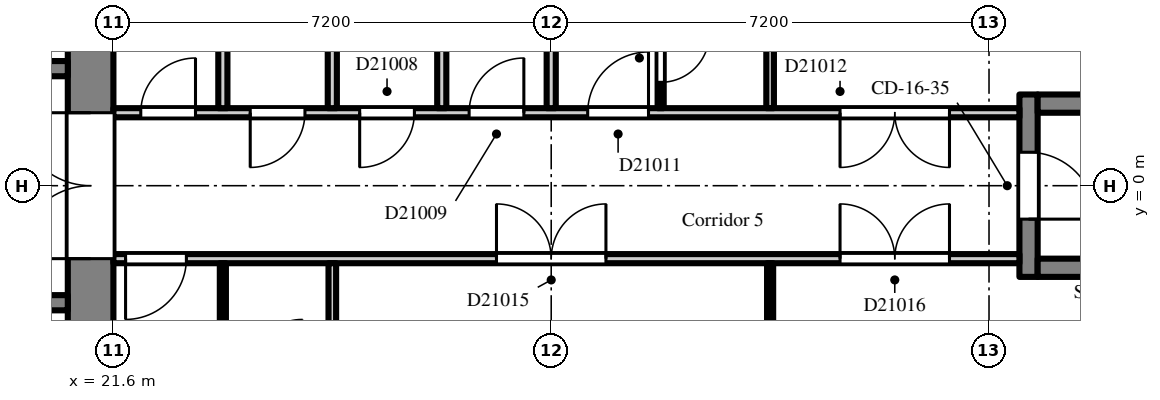
"""IFC4 building model, lengths in metres.
Left out: names, types, materials, properties, quantities, classifications, styles, units other than length and angle.
Written with IfcOpenShell. Run it as: python <this file> out.ifc"""

import sys

from ifc_helpers import new_model, si_unit, direction, frame, frame_2d, origin, place, context, subcontext, project, spatial, rectangle, extrude, element, fill, save


model = new_model("IFC4")
c1 = context("Model", 3, precision=1e-05, world=origin(), true_north=direction((0.0, 1.0)))
c2 = subcontext(c1, "Body", "Model", "MODEL_VIEW")
j1 = project(units=[si_unit("LENGTHUNIT", "METRE"), si_unit("PLANEANGLEUNIT", "RADIAN")], contexts=[c1])
p1 = place(None, origin())
s1 = spatial("IfcSite", under=j1, at=p1, CompositionType="ELEMENT")
p2 = place(p1, origin())
s2 = spatial("IfcBuilding", under=s1, at=p2, CompositionType="ELEMENT")
p3 = place(p2, frame((0.0, 0.0, 147.3)))
s3 = spatial("IfcBuildingStorey", under=s2, at=p3, CompositionType="ELEMENT", Elevation=147.3)
p4 = place(p3, frame((21.225, -7.2, 0.0), z_axis=(0.0, 0.0, 1.0), x_axis=(0.0, 1.0, 0.0)))
e1 = element("IfcWall", 1, at=p4, inside=s3, PredefinedType="SHEAR", context=c2, shape_type="SweptSolid", body=[
    extrude(rectangle(XDim=14.4, YDim=0.75, at=frame_2d((7.2, 0.0))), origin(), (0.0, 0.0, 1.0), 2.6),
])
p5 = place(p4, frame((6.0, 0.0, 0.0)))
e2 = element("IfcOpeningElement", 2, at=p5, cuts=e1, PredefinedType="OPENING", context=c2, shape_type="SweptSolid", body=[
    extrude(rectangle(XDim=2.4, YDim=2.2, at=frame_2d((1.2, 1.1))), frame((0.0, 0.385, 0.0), z_axis=(0.0, -1.0, 0.0), x_axis=(1.0, 0.0, 0.0)), (0.0, 0.0, 1.0), 0.77),
])
p6 = place(p3, frame((7.9, 1.925, 0.0), z_axis=(0.0, 0.0, 1.0), x_axis=(1.0, 0.0, 0.0)))
e3 = element("IfcWall", 3, at=p6, inside=s3, PredefinedType="SHEAR", context=c2, shape_type="SweptSolid", body=[
    extrude(rectangle(XDim=12.95, YDim=0.25, at=frame_2d((6.475, 0.0))), origin(), (0.0, 0.0, 1.0), 2.6),
])
p7 = place(p6, frame((4.825, 0.0, 0.0)))
e4 = element("IfcOpeningElement", 4, at=p7, cuts=e3, PredefinedType="OPENING", context=c2, shape_type="SweptSolid", body=[
    extrude(rectangle(XDim=1.1, YDim=2.1, at=frame_2d((0.55, 1.05))), frame((0.0, 0.135, 0.0), z_axis=(0.0, -1.0, 0.0), x_axis=(1.0, 0.0, 0.0)), (0.0, 0.0, 1.0), 0.27),
])
p8 = place(p6, frame((7.025, 0.0, 0.0)))
e5 = element("IfcOpeningElement", 5, at=p8, cuts=e3, PredefinedType="OPENING", context=c2, shape_type="SweptSolid", body=[
    extrude(rectangle(XDim=1.1, YDim=2.1, at=frame_2d((0.55, 1.05))), frame((0.0, 0.135, 0.0), z_axis=(0.0, -1.0, 0.0), x_axis=(1.0, 0.0, 0.0)), (0.0, 0.0, 1.0), 0.27),
])
p9 = place(p6, frame((9.225, 0.0, 0.0)))
e6 = element("IfcOpeningElement", 6, at=p9, cuts=e3, PredefinedType="OPENING", context=c2, shape_type="SweptSolid", body=[
    extrude(rectangle(XDim=1.1, YDim=2.1, at=frame_2d((0.55, 1.05))), frame((0.0, 0.135, 0.0), z_axis=(0.0, -1.0, 0.0), x_axis=(1.0, 0.0, 0.0)), (0.0, 0.0, 1.0), 0.27),
])
p10 = place(p6, frame((0.525, 0.0, 0.0)))
e7 = element("IfcOpeningElement", 7, at=p10, cuts=e3, PredefinedType="OPENING", context=c2, shape_type="SweptSolid", body=[
    extrude(rectangle(XDim=0.9, YDim=2.1, at=frame_2d((0.45, 1.05))), frame((0.0, 0.135, 0.0), z_axis=(0.0, -1.0, 0.0), x_axis=(1.0, 0.0, 0.0)), (0.0, 0.0, 1.0), 0.27),
])
p11 = place(p6, frame((2.625, 0.0, 0.0)))
e8 = element("IfcOpeningElement", 8, at=p11, cuts=e3, PredefinedType="OPENING", context=c2, shape_type="SweptSolid", body=[
    extrude(rectangle(XDim=1.1, YDim=2.1, at=frame_2d((0.55, 1.05))), frame((0.0, 0.135, 0.0), z_axis=(0.0, -1.0, 0.0), x_axis=(1.0, 0.0, 0.0)), (0.0, 0.0, 1.0), 0.27),
])
p12 = place(p6, frame((11.525, 0.0, 0.0)))
e9 = element("IfcOpeningElement", 9, at=p12, cuts=e3, PredefinedType="OPENING", context=c2, shape_type="SweptSolid", body=[
    extrude(rectangle(XDim=0.9, YDim=2.1, at=frame_2d((0.45, 1.05))), frame((0.0, 0.135, 0.0), z_axis=(0.0, -1.0, 0.0), x_axis=(1.0, 0.0, 0.0)), (0.0, 0.0, 1.0), 0.27),
])
p13 = place(p3, frame((7.9, -1.925, 0.0), z_axis=(0.0, 0.0, 1.0), x_axis=(1.0, 0.0, 0.0)))
e10 = element("IfcWall", 10, at=p13, inside=s3, PredefinedType="SHEAR", context=c2, shape_type="SweptSolid", body=[
    extrude(rectangle(XDim=12.95, YDim=0.25, at=frame_2d((6.475, 0.0))), origin(), (0.0, 0.0, 1.0), 2.6),
])
p14 = place(p13, frame((0.525, 0.0, 0.0)))
e11 = element("IfcOpeningElement", 11, at=p14, cuts=e10, PredefinedType="OPENING", context=c2, shape_type="SweptSolid", body=[
    extrude(rectangle(XDim=0.9, YDim=2.1, at=frame_2d((0.45, 1.05))), frame((0.0, 0.135, 0.0), z_axis=(0.0, -1.0, 0.0), x_axis=(1.0, 0.0, 0.0)), (0.0, 0.0, 1.0), 0.27),
])
p15 = place(p13, frame((2.625, 0.0, 0.0)))
e12 = element("IfcOpeningElement", 12, at=p15, cuts=e10, PredefinedType="OPENING", context=c2, shape_type="SweptSolid", body=[
    extrude(rectangle(XDim=1.1, YDim=2.1, at=frame_2d((0.55, 1.05))), frame((0.0, 0.135, 0.0), z_axis=(0.0, -1.0, 0.0), x_axis=(1.0, 0.0, 0.0)), (0.0, 0.0, 1.0), 0.27),
])
p16 = place(p13, frame((4.925, 0.0, 0.0)))
e13 = element("IfcOpeningElement", 13, at=p16, cuts=e10, PredefinedType="OPENING", context=c2, shape_type="SweptSolid", body=[
    extrude(rectangle(XDim=0.9, YDim=2.1, at=frame_2d((0.45, 1.05))), frame((0.0, 0.135, 0.0), z_axis=(0.0, -1.0, 0.0), x_axis=(1.0, 0.0, 0.0)), (0.0, 0.0, 1.0), 0.27),
])
p17 = place(p13, frame((8.225, 0.0, 0.0)))
e14 = element("IfcOpeningElement", 14, at=p17, cuts=e10, PredefinedType="OPENING", context=c2, shape_type="SweptSolid", body=[
    extrude(rectangle(XDim=0.9, YDim=2.1, at=frame_2d((0.45, 1.05))), frame((0.0, 0.135, 0.0), z_axis=(0.0, -1.0, 0.0), x_axis=(1.0, 0.0, 0.0)), (0.0, 0.0, 1.0), 0.27),
])
p18 = place(p13, frame((11.525, 0.0, 0.0)))
e15 = element("IfcOpeningElement", 15, at=p18, cuts=e10, PredefinedType="OPENING", context=c2, shape_type="SweptSolid", body=[
    extrude(rectangle(XDim=0.9, YDim=2.1, at=frame_2d((0.45, 1.05))), frame((0.0, 0.135, 0.0), z_axis=(0.0, -1.0, 0.0), x_axis=(1.0, 0.0, 0.0)), (0.0, 0.0, 1.0), 0.27),
])
p19 = place(p3, frame((36.65, -1.5, 0.0), z_axis=(0.0, 0.0, 1.0), x_axis=(0.0, 1.0, 0.0)))
e16 = element("IfcWall", 16, at=p19, inside=s3, PredefinedType="SHEAR", context=c2, shape_type="SweptSolid", body=[
    extrude(rectangle(XDim=3.0, YDim=0.3, at=frame_2d((1.5, 0.0))), origin(), (0.0, 0.0, 1.0), 2.6),
])
p20 = place(p19, frame((0.95, 0.0, 0.0)))
e17 = element("IfcOpeningElement", 17, at=p20, cuts=e16, PredefinedType="OPENING", context=c2, shape_type="SweptSolid", body=[
    extrude(rectangle(XDim=1.1, YDim=2.1, at=frame_2d((0.55, 1.05))), frame((0.0, 0.16, 0.0), z_axis=(0.0, -1.0, 0.0), x_axis=(1.0, 0.0, 0.0)), (0.0, 0.0, 1.0), 0.32),
])
for number, where, z_axis, x_axis in (
    (18, (36.8, -1.35, 0.0), (0.0, 0.0, 1.0), (1.0, 0.0, 0.0)),
    (19, (36.8, 1.35, 0.0), (0.0, 0.0, 1.0), (1.0, 0.0, 0.0)),
):
    element("IfcWall", number, at=place(p3, frame(where, z_axis=z_axis, x_axis=x_axis)), inside=s3, PredefinedType="SHEAR", context=c2, shape_type="SweptSolid", body=[
        extrude(rectangle(XDim=5.8, YDim=0.3, at=frame_2d((2.9, 0.0))), origin(), (0.0, 0.0, 1.0), 2.6),
    ])
p21 = place(p3, frame((21.6, -1.2, 0.0), z_axis=(0.0, 0.0, 1.0), x_axis=(1.0, 0.0, 0.0)))
e20 = element("IfcWall", 20, at=p21, inside=s3, PredefinedType="PARTITIONING", context=c2, shape_type="SweptSolid", body=[
    extrude(rectangle(XDim=14.9, YDim=0.15, at=frame_2d((7.45, 0.0))), origin(), (0.0, 0.0, 1.0), 2.6),
])
p22 = place(p21, frame((0.2, 0.0, 0.0)))
e21 = element("IfcOpeningElement", 21, at=p22, cuts=e20, PredefinedType="OPENING", context=c2, shape_type="SweptSolid", body=[
    extrude(rectangle(XDim=1.0, YDim=2.1, at=frame_2d((0.5, 1.05))), frame((0.0, 0.085, 0.0), z_axis=(0.0, -1.0, 0.0), x_axis=(1.0, 0.0, 0.0)), (0.0, 0.0, 1.0), 0.17),
])
p23 = place(p21, frame((6.3, 0.0, 0.0)))
e22 = element("IfcOpeningElement", 22, at=p23, cuts=e20, PredefinedType="OPENING", context=c2, shape_type="SweptSolid", body=[
    extrude(rectangle(XDim=1.8, YDim=2.1, at=frame_2d((0.9, 1.05))), frame((0.0, 0.085, 0.0), z_axis=(0.0, -1.0, 0.0), x_axis=(1.0, 0.0, 0.0)), (0.0, 0.0, 1.0), 0.17),
])
p24 = place(p21, frame((11.95, 0.0, 0.0)))
e23 = element("IfcOpeningElement", 23, at=p24, cuts=e20, PredefinedType="OPENING", context=c2, shape_type="SweptSolid", body=[
    extrude(rectangle(XDim=1.8, YDim=2.1, at=frame_2d((0.9, 1.05))), frame((0.0, 0.085, 0.0), z_axis=(0.0, -1.0, 0.0), x_axis=(1.0, 0.0, 0.0)), (0.0, 0.0, 1.0), 0.17),
])
p25 = place(p3, frame((21.6, 1.2, 0.0), z_axis=(0.0, 0.0, 1.0), x_axis=(1.0, 0.0, 0.0)))
e24 = element("IfcWall", 24, at=p25, inside=s3, PredefinedType="PARTITIONING", context=c2, shape_type="SweptSolid", body=[
    extrude(rectangle(XDim=14.9, YDim=0.15, at=frame_2d((7.45, 0.0))), origin(), (0.0, 0.0, 1.0), 2.6),
])
p26 = place(p25, frame((0.45, 0.0, 0.0)))
e25 = element("IfcOpeningElement", 25, at=p26, cuts=e24, PredefinedType="OPENING", context=c2, shape_type="SweptSolid", body=[
    extrude(rectangle(XDim=0.9, YDim=2.1, at=frame_2d((0.45, 1.05))), frame((0.0, 0.085, 0.0), z_axis=(0.0, -1.0, 0.0), x_axis=(1.0, 0.0, 0.0)), (0.0, 0.0, 1.0), 0.17),
])
p27 = place(p25, frame((2.25, 0.0, 0.0)))
e26 = element("IfcOpeningElement", 26, at=p27, cuts=e24, PredefinedType="OPENING", context=c2, shape_type="SweptSolid", body=[
    extrude(rectangle(XDim=0.9, YDim=2.1, at=frame_2d((0.45, 1.05))), frame((0.0, 0.085, 0.0), z_axis=(0.0, -1.0, 0.0), x_axis=(1.0, 0.0, 0.0)), (0.0, 0.0, 1.0), 0.17),
])
p28 = place(p25, frame((4.05, 0.0, 0.0)))
e27 = element("IfcOpeningElement", 27, at=p28, cuts=e24, PredefinedType="OPENING", context=c2, shape_type="SweptSolid", body=[
    extrude(rectangle(XDim=0.9, YDim=2.1, at=frame_2d((0.45, 1.05))), frame((0.0, 0.085, 0.0), z_axis=(0.0, -1.0, 0.0), x_axis=(1.0, 0.0, 0.0)), (0.0, 0.0, 1.0), 0.17),
])
p29 = place(p25, frame((5.85, 0.0, 0.0)))
e28 = element("IfcOpeningElement", 28, at=p29, cuts=e24, PredefinedType="OPENING", context=c2, shape_type="SweptSolid", body=[
    extrude(rectangle(XDim=0.9, YDim=2.1, at=frame_2d((0.45, 1.05))), frame((0.0, 0.085, 0.0), z_axis=(0.0, -1.0, 0.0), x_axis=(1.0, 0.0, 0.0)), (0.0, 0.0, 1.0), 0.17),
])
p30 = place(p25, frame((7.8, 0.0, 0.0)))
e29 = element("IfcOpeningElement", 29, at=p30, cuts=e24, PredefinedType="OPENING", context=c2, shape_type="SweptSolid", body=[
    extrude(rectangle(XDim=1.0, YDim=2.1, at=frame_2d((0.5, 1.05))), frame((0.0, 0.085, 0.0), z_axis=(0.0, -1.0, 0.0), x_axis=(1.0, 0.0, 0.0)), (0.0, 0.0, 1.0), 0.17),
])
p31 = place(p25, frame((11.95, 0.0, 0.0)))
e30 = element("IfcOpeningElement", 30, at=p31, cuts=e24, PredefinedType="OPENING", context=c2, shape_type="SweptSolid", body=[
    extrude(rectangle(XDim=1.8, YDim=2.1, at=frame_2d((0.9, 1.05))), frame((0.0, 0.085, 0.0), z_axis=(0.0, -1.0, 0.0), x_axis=(1.0, 0.0, 0.0)), (0.0, 0.0, 1.0), 0.17),
])
p32 = place(p3, frame((23.4, -3.05, 0.0), z_axis=(0.0, 0.0, 1.0), x_axis=(0.0, 1.0, 0.0)))
e31 = element("IfcWall", 31, at=p32, inside=s3, PredefinedType="PARTITIONING", context=c2, shape_type="SweptSolid", body=[
    extrude(rectangle(XDim=1.775, YDim=0.1, at=frame_2d((0.888, 0.0))), origin(), (0.0, 0.0, 1.0), 2.6),
])
p33 = place(p3, frame((23.4, 1.275, 0.0), z_axis=(0.0, 0.0, 1.0), x_axis=(0.0, 1.0, 0.0)))
e32 = element("IfcWall", 32, at=p33, inside=s3, PredefinedType="PARTITIONING", context=c2, shape_type="SweptSolid", body=[
    extrude(rectangle(XDim=5.625, YDim=0.15, at=frame_2d((2.812, 0.0))), origin(), (0.0, 0.0, 1.0), 2.6),
])
p34 = place(p3, frame((25.2, -3.0, 0.0), z_axis=(0.0, 0.0, 1.0), x_axis=(0.0, 1.0, 0.0)))
e33 = element("IfcWall", 33, at=p34, inside=s3, PredefinedType="PARTITIONING", context=c2, shape_type="SweptSolid", body=[
    extrude(rectangle(XDim=1.725, YDim=0.125, at=frame_2d((0.863, 0.0))), origin(), (0.0, 0.0, 1.0), 2.6),
])
for number, where, z_axis, x_axis in (
    (34, (25.2, 1.275, 0.0), (0.0, 0.0, 1.0), (0.0, 1.0, 0.0)),
    (35, (27.0, 1.275, 0.0), (0.0, 0.0, 1.0), (0.0, 1.0, 0.0)),
    (36, (28.8, 1.275, 0.0), (0.0, 0.0, 1.0), (0.0, 1.0, 0.0)),
):
    element("IfcWall", number, at=place(p3, frame(where, z_axis=z_axis, x_axis=x_axis)), inside=s3, PredefinedType="PARTITIONING", context=c2, shape_type="SweptSolid", body=[
        extrude(rectangle(XDim=5.625, YDim=0.15, at=frame_2d((2.812, 0.0))), origin(), (0.0, 0.0, 1.0), 2.6),
    ])
p35 = place(p3, frame((30.6, 1.275, 0.0), z_axis=(0.0, 0.0, 1.0), x_axis=(0.0, 1.0, 0.0)))
e37 = element("IfcWall", 37, at=p35, inside=s3, PredefinedType="PARTITIONING", context=c2, shape_type="SweptSolid", body=[
    extrude(rectangle(XDim=1.775, YDim=0.1, at=frame_2d((0.888, 0.0))), origin(), (0.0, 0.0, 1.0), 2.6),
])
p36 = place(p35, frame((0.425, 0.0, 0.0)))
e38 = element("IfcOpeningElement", 38, at=p36, cuts=e37, PredefinedType="OPENING", context=c2, shape_type="SweptSolid", body=[
    extrude(rectangle(XDim=0.8, YDim=2.1, at=frame_2d((0.4, 1.05))), frame((0.0, 0.06, 0.0), z_axis=(0.0, -1.0, 0.0), x_axis=(1.0, 0.0, 0.0)), (0.0, 0.0, 1.0), 0.12),
])
p37 = place(p3, frame((32.4, -6.9, 0.0), z_axis=(0.0, 0.0, 1.0), x_axis=(0.0, 1.0, 0.0)))
e39 = element("IfcWall", 39, at=p37, inside=s3, PredefinedType="PARTITIONING", context=c2, shape_type="SweptSolid", body=[
    extrude(rectangle(XDim=5.625, YDim=0.1, at=frame_2d((2.812, 0.0))), origin(), (0.0, 0.0, 1.0), 2.6),
])
p38 = place(p3, frame((32.4, 1.275, 0.0), z_axis=(0.0, 0.0, 1.0), x_axis=(0.0, 1.0, 0.0)))
e40 = element("IfcWall", 40, at=p38, inside=s3, PredefinedType="PARTITIONING", context=c2, shape_type="SweptSolid", body=[
    extrude(rectangle(XDim=1.725, YDim=0.125, at=frame_2d((0.863, 0.0))), origin(), (0.0, 0.0, 1.0), 2.6),
])
p39 = place(p5, origin())
e41 = element("IfcDoor", 41, at=p39, inside=s3, OperationType="DOUBLE_DOOR_DOUBLE_SWING", PredefinedType="DOOR", context=c2, shape_type="SweptSolid", body=[
    extrude(rectangle(XDim=2.4, YDim=2.2, at=frame_2d((1.2, 1.1))), frame((0.0, 0.025, 0.0), z_axis=(0.0, -1.0, 0.0), x_axis=(1.0, 0.0, 0.0)), (0.0, 0.0, 1.0), 0.05),
])
fill(e2, e41)
p40 = place(p20, frame((1.1, 0.0, 0.0), z_axis=(0.0, 0.0, 1.0), x_axis=(-1.0, 0.0, 0.0)))
e42 = element("IfcDoor", 42, at=p40, inside=s3, OperationType="SINGLE_SWING_RIGHT", PredefinedType="DOOR", context=c2, shape_type="SweptSolid", body=[
    extrude(rectangle(XDim=1.1, YDim=2.1, at=frame_2d((0.55, 1.05))), frame((0.0, 0.025, 0.0), z_axis=(0.0, -1.0, 0.0), x_axis=(1.0, 0.0, 0.0)), (0.0, 0.0, 1.0), 0.05),
])
fill(e17, e42)
p41 = place(p26, origin())
e43 = element("IfcDoor", 43, at=p41, inside=s3, OperationType="SINGLE_SWING_RIGHT", PredefinedType="DOOR", context=c2, shape_type="SweptSolid", body=[
    extrude(rectangle(XDim=0.9, YDim=2.1, at=frame_2d((0.45, 1.05))), frame((0.0, 0.025, 0.0), z_axis=(0.0, -1.0, 0.0), x_axis=(1.0, 0.0, 0.0)), (0.0, 0.0, 1.0), 0.05),
])
fill(e25, e43)
p42 = place(p27, frame((0.9, 0.0, 0.0), z_axis=(0.0, 0.0, 1.0), x_axis=(-1.0, 0.0, 0.0)))
e44 = element("IfcDoor", 44, at=p42, inside=s3, OperationType="SINGLE_SWING_RIGHT", PredefinedType="DOOR", context=c2, shape_type="SweptSolid", body=[
    extrude(rectangle(XDim=0.9, YDim=2.1, at=frame_2d((0.45, 1.05))), frame((0.0, 0.025, 0.0), z_axis=(0.0, -1.0, 0.0), x_axis=(1.0, 0.0, 0.0)), (0.0, 0.0, 1.0), 0.05),
])
fill(e26, e44)
p43 = place(p28, frame((0.9, 0.0, 0.0), z_axis=(0.0, 0.0, 1.0), x_axis=(-1.0, 0.0, 0.0)))
e45 = element("IfcDoor", 45, at=p43, inside=s3, OperationType="SINGLE_SWING_RIGHT", PredefinedType="DOOR", context=c2, shape_type="SweptSolid", body=[
    extrude(rectangle(XDim=0.9, YDim=2.1, at=frame_2d((0.45, 1.05))), frame((0.0, 0.025, 0.0), z_axis=(0.0, -1.0, 0.0), x_axis=(1.0, 0.0, 0.0)), (0.0, 0.0, 1.0), 0.05),
])
fill(e27, e45)
p44 = place(p29, origin())
e46 = element("IfcDoor", 46, at=p44, inside=s3, OperationType="SINGLE_SWING_RIGHT", PredefinedType="DOOR", context=c2, shape_type="SweptSolid", body=[
    extrude(rectangle(XDim=0.9, YDim=2.1, at=frame_2d((0.45, 1.05))), frame((0.0, 0.025, 0.0), z_axis=(0.0, -1.0, 0.0), x_axis=(1.0, 0.0, 0.0)), (0.0, 0.0, 1.0), 0.05),
])
fill(e28, e46)
p45 = place(p36, frame((0.8, 0.0, 0.0), z_axis=(0.0, 0.0, 1.0), x_axis=(-1.0, 0.0, 0.0)))
e47 = element("IfcDoor", 47, at=p45, inside=s3, OperationType="SINGLE_SWING_LEFT", PredefinedType="DOOR", context=c2, shape_type="SweptSolid", body=[
    extrude(rectangle(XDim=0.8, YDim=2.1, at=frame_2d((0.4, 1.05))), frame((0.0, 0.025, 0.0), z_axis=(0.0, -1.0, 0.0), x_axis=(1.0, 0.0, 0.0)), (0.0, 0.0, 1.0), 0.05),
])
fill(e38, e47)
p46 = place(p30, origin())
e48 = element("IfcDoor", 48, at=p46, inside=s3, OperationType="SINGLE_SWING_RIGHT", PredefinedType="DOOR", context=c2, shape_type="SweptSolid", body=[
    extrude(rectangle(XDim=1.0, YDim=2.1, at=frame_2d((0.5, 1.05))), frame((0.0, 0.025, 0.0), z_axis=(0.0, -1.0, 0.0), x_axis=(1.0, 0.0, 0.0)), (0.0, 0.0, 1.0), 0.05),
])
fill(e29, e48)
p47 = place(p31, frame((1.8, 0.0, 0.0), z_axis=(0.0, 0.0, 1.0), x_axis=(-1.0, 0.0, 0.0)))
e49 = element("IfcDoor", 49, at=p47, inside=s3, OperationType="DOUBLE_DOOR_DOUBLE_SWING", PredefinedType="DOOR", context=c2, shape_type="SweptSolid", body=[
    extrude(rectangle(XDim=1.8, YDim=2.1, at=frame_2d((0.9, 1.05))), frame((0.0, 0.025, 0.0), z_axis=(0.0, -1.0, 0.0), x_axis=(1.0, 0.0, 0.0)), (0.0, 0.0, 1.0), 0.05),
])
fill(e30, e49)
p48 = place(p22, frame((1.0, 0.0, 0.0), z_axis=(0.0, 0.0, 1.0), x_axis=(-1.0, 0.0, 0.0)))
e50 = element("IfcDoor", 50, at=p48, inside=s3, OperationType="SINGLE_SWING_RIGHT", PredefinedType="DOOR", context=c2, shape_type="SweptSolid", body=[
    extrude(rectangle(XDim=1.0, YDim=2.1, at=frame_2d((0.5, 1.05))), frame((0.0, 0.025, 0.0), z_axis=(0.0, -1.0, 0.0), x_axis=(1.0, 0.0, 0.0)), (0.0, 0.0, 1.0), 0.05),
])
fill(e21, e50)
p49 = place(p23, origin())
e51 = element("IfcDoor", 51, at=p49, inside=s3, OperationType="DOUBLE_DOOR_DOUBLE_SWING", PredefinedType="DOOR", context=c2, shape_type="SweptSolid", body=[
    extrude(rectangle(XDim=1.8, YDim=2.1, at=frame_2d((0.9, 1.05))), frame((0.0, 0.025, 0.0), z_axis=(0.0, -1.0, 0.0), x_axis=(1.0, 0.0, 0.0)), (0.0, 0.0, 1.0), 0.05),
])
fill(e22, e51)
p50 = place(p24, origin())
e52 = element("IfcDoor", 52, at=p50, inside=s3, OperationType="DOUBLE_DOOR_DOUBLE_SWING", PredefinedType="DOOR", context=c2, shape_type="SweptSolid", body=[
    extrude(rectangle(XDim=1.8, YDim=2.1, at=frame_2d((0.9, 1.05))), frame((0.0, 0.025, 0.0), z_axis=(0.0, -1.0, 0.0), x_axis=(1.0, 0.0, 0.0)), (0.0, 0.0, 1.0), 0.05),
])
fill(e23, e52)
save(model, sys.argv[1])
